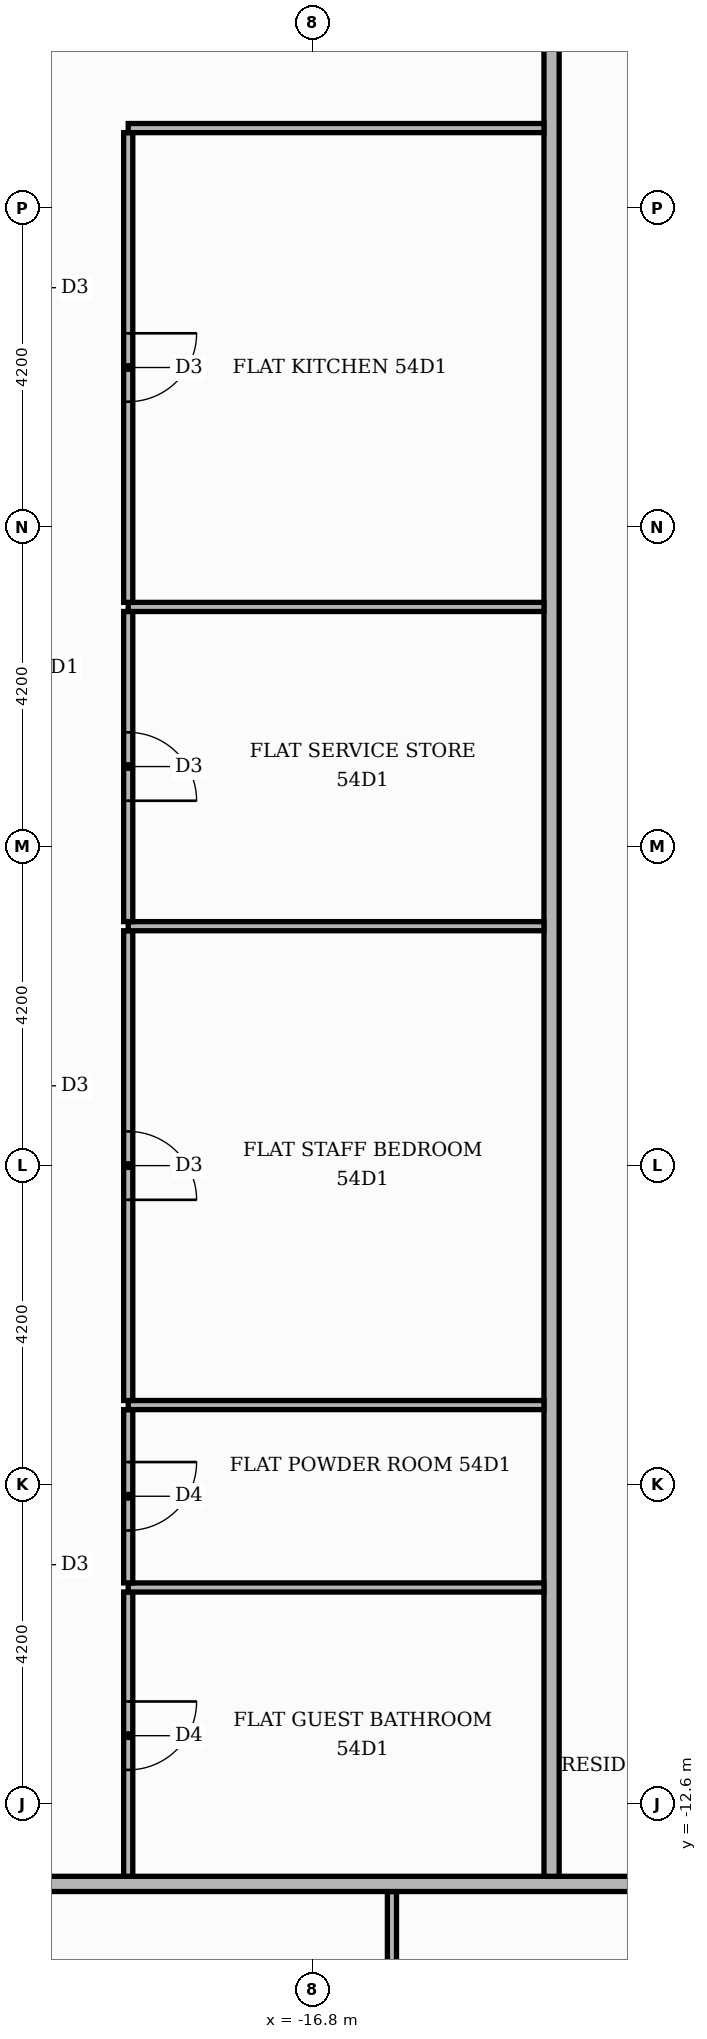
"""IFC4 building model, lengths in metres.
Left out: names, types, materials, properties, quantities, classifications, styles, units other than length and angle.
Written with IfcOpenShell. Run it as: python <this file> out.ifc"""

import sys

from ifc_helpers import new_model, si_unit, direction, frame, frame_2d, origin, place, context, subcontext, project, spatial, rectangle, extrude, element, fill, save


model = new_model("IFC4")
c1 = context("Model", 3, precision=1e-05, world=origin(), true_north=direction((0.0, 1.0)))
c2 = subcontext(c1, "Body", "Model", "MODEL_VIEW")
j1 = project(units=[si_unit("LENGTHUNIT", "METRE"), si_unit("PLANEANGLEUNIT", "RADIAN")], contexts=[c1])
p1 = place(None, origin())
s1 = spatial("IfcSite", under=j1, at=p1, CompositionType="ELEMENT")
p2 = place(p1, origin())
s2 = spatial("IfcBuilding", under=s1, at=p2, CompositionType="ELEMENT")
p3 = place(p2, frame((0.0, 0.0, 227.4)))
s3 = spatial("IfcBuildingStorey", under=s2, at=p3, CompositionType="ELEMENT", Elevation=227.4)
p4 = place(p3, frame((-15.75, -20.36, 0.0), z_axis=(0.0, 0.0, 1.0), x_axis=(0.0, 1.0, 0.0)))
e1 = element("IfcWall", 1, at=p4, inside=s3, PredefinedType="PARTITIONING", context=c2, shape_type="SweptSolid", body=[
    extrude(rectangle(XDim=6.61, YDim=0.12, at=frame_2d((3.305, 0.0))), origin(), (0.0, 0.0, 1.0), 3.48),
])
p5 = place(p4, frame((2.825, 0.0, 0.0)))
e2 = element("IfcOpeningElement", 2, at=p5, cuts=e1, PredefinedType="OPENING", context=c2, shape_type="SweptSolid", body=[
    extrude(rectangle(XDim=1.0, YDim=2.1, at=frame_2d((0.5, 1.05))), frame((0.0, 0.07, 0.0), z_axis=(0.0, -1.0, 0.0), x_axis=(1.0, 0.0, 0.0)), (0.0, 0.0, 1.0), 0.14),
])
p6 = place(p3, frame((-25.42, -13.65, 0.0), z_axis=(0.0, 0.0, 1.0), x_axis=(1.0, 0.0, 0.0)))
e3 = element("IfcWall", 3, at=p6, inside=s3, PredefinedType="PARTITIONING", context=c2, shape_type="SweptSolid", body=[
    extrude(rectangle(XDim=39.07, YDim=0.2, at=frame_2d((19.535, 0.0))), origin(), (0.0, 0.0, 1.0), 3.48),
])
p7 = place(p6, frame((13.32, 0.0, 0.0)))
e4 = element("IfcOpeningElement", 4, at=p7, cuts=e3, PredefinedType="OPENING", context=c2, shape_type="SweptSolid", body=[
    extrude(rectangle(XDim=1.1, YDim=2.4, at=frame_2d((0.55, 1.2))), frame((0.0, 0.11, 0.0), z_axis=(0.0, -1.0, 0.0), x_axis=(1.0, 0.0, 0.0)), (0.0, 0.0, 1.0), 0.22),
])
p8 = place(p6, frame((23.82, 0.0, 0.0)))
e5 = element("IfcOpeningElement", 5, at=p8, cuts=e3, PredefinedType="OPENING", context=c2, shape_type="SweptSolid", body=[
    extrude(rectangle(XDim=1.1, YDim=2.4, at=frame_2d((0.55, 1.2))), frame((0.0, 0.11, 0.0), z_axis=(0.0, -1.0, 0.0), x_axis=(1.0, 0.0, 0.0)), (0.0, 0.0, 1.0), 0.22),
])
p9 = place(p3, frame((-19.22, -13.55, 0.0), z_axis=(0.0, 0.0, 1.0), x_axis=(0.0, 1.0, 0.0)))
e6 = element("IfcWall", 6, at=p9, inside=s3, PredefinedType="PARTITIONING", context=c2, shape_type="SweptSolid", body=[
    extrude(rectangle(XDim=3.74, YDim=0.12, at=frame_2d((1.87, 0.0))), origin(), (0.0, 0.0, 1.0), 3.48),
])
p10 = place(p9, frame((1.4, 0.0, 0.0)))
e7 = element("IfcOpeningElement", 7, at=p10, cuts=e6, PredefinedType="OPENING", context=c2, shape_type="SweptSolid", body=[
    extrude(rectangle(XDim=0.9, YDim=2.1, at=frame_2d((0.45, 1.05))), frame((0.0, 0.07, 0.0), z_axis=(0.0, -1.0, 0.0), x_axis=(1.0, 0.0, 0.0)), (0.0, 0.0, 1.0), 0.14),
])
p11 = place(p3, frame((-13.65, -13.55, 0.0), z_axis=(0.0, 0.0, 1.0), x_axis=(0.0, 1.0, 0.0)))
e8 = element("IfcWall", 8, at=p11, inside=s3, PredefinedType="PARTITIONING", context=c2, shape_type="SweptSolid", body=[
    extrude(rectangle(XDim=27.1, YDim=0.2, at=frame_2d((13.55, 0.0))), origin(), (0.0, 0.0, 1.0), 3.48),
])
p12 = place(p11, frame((24.55, 0.0, 0.0)))
e9 = element("IfcOpeningElement", 9, at=p12, cuts=e8, PredefinedType="OPENING", context=c2, shape_type="SweptSolid", body=[
    extrude(rectangle(XDim=1.1, YDim=2.4, at=frame_2d((0.55, 1.2))), frame((0.0, 0.11, 0.0), z_axis=(0.0, -1.0, 0.0), x_axis=(1.0, 0.0, 0.0)), (0.0, 0.0, 1.0), 0.22),
])
p13 = place(p3, frame((-19.22, -9.75, 0.0), z_axis=(0.0, 0.0, 1.0), x_axis=(1.0, 0.0, 0.0)))
e10 = element("IfcWall", 10, at=p13, inside=s3, PredefinedType="PARTITIONING", context=c2, shape_type="SweptSolid", body=[
    extrude(rectangle(XDim=5.47, YDim=0.12, at=frame_2d((2.735, 0.0))), origin(), (0.0, 0.0, 1.0), 3.48),
])
p14 = place(p3, frame((-19.22, -9.69, 0.0), z_axis=(0.0, 0.0, 1.0), x_axis=(0.0, 1.0, 0.0)))
e11 = element("IfcWall", 11, at=p14, inside=s3, PredefinedType="PARTITIONING", context=c2, shape_type="SweptSolid", body=[
    extrude(rectangle(XDim=2.28, YDim=0.12, at=frame_2d((1.14, 0.0))), origin(), (0.0, 0.0, 1.0), 3.48),
])
p15 = place(p14, frame((0.69, 0.0, 0.0)))
e12 = element("IfcOpeningElement", 12, at=p15, cuts=e11, PredefinedType="OPENING", context=c2, shape_type="SweptSolid", body=[
    extrude(rectangle(XDim=0.9, YDim=2.1, at=frame_2d((0.45, 1.05))), frame((0.0, 0.07, 0.0), z_axis=(0.0, -1.0, 0.0), x_axis=(1.0, 0.0, 0.0)), (0.0, 0.0, 1.0), 0.14),
])
p16 = place(p3, frame((-19.22, -7.35, 0.0), z_axis=(0.0, 0.0, 1.0), x_axis=(1.0, 0.0, 0.0)))
e13 = element("IfcWall", 13, at=p16, inside=s3, PredefinedType="PARTITIONING", context=c2, shape_type="SweptSolid", body=[
    extrude(rectangle(XDim=5.47, YDim=0.12, at=frame_2d((2.735, 0.0))), origin(), (0.0, 0.0, 1.0), 3.48),
])
p17 = place(p3, frame((-19.22, -7.29, 0.0), z_axis=(0.0, 0.0, 1.0), x_axis=(0.0, 1.0, 0.0)))
e14 = element("IfcWall", 14, at=p17, inside=s3, PredefinedType="PARTITIONING", context=c2, shape_type="SweptSolid", body=[
    extrude(rectangle(XDim=6.18, YDim=0.12, at=frame_2d((3.09, 0.0))), origin(), (0.0, 0.0, 1.0), 3.48),
])
p18 = place(p17, frame((2.64, 0.0, 0.0)))
e15 = element("IfcOpeningElement", 15, at=p18, cuts=e14, PredefinedType="OPENING", context=c2, shape_type="SweptSolid", body=[
    extrude(rectangle(XDim=0.9, YDim=2.1, at=frame_2d((0.45, 1.05))), frame((0.0, 0.07, 0.0), z_axis=(0.0, -1.0, 0.0), x_axis=(1.0, 0.0, 0.0)), (0.0, 0.0, 1.0), 0.14),
])
p19 = place(p3, frame((-19.22, -1.05, 0.0), z_axis=(0.0, 0.0, 1.0), x_axis=(1.0, 0.0, 0.0)))
e16 = element("IfcWall", 16, at=p19, inside=s3, PredefinedType="PARTITIONING", context=c2, shape_type="SweptSolid", body=[
    extrude(rectangle(XDim=5.47, YDim=0.12, at=frame_2d((2.735, 0.0))), origin(), (0.0, 0.0, 1.0), 3.48),
])
p20 = place(p3, frame((-19.22, -0.99, 0.0), z_axis=(0.0, 0.0, 1.0), x_axis=(0.0, 1.0, 0.0)))
e17 = element("IfcWall", 17, at=p20, inside=s3, PredefinedType="PARTITIONING", context=c2, shape_type="SweptSolid", body=[
    extrude(rectangle(XDim=4.08, YDim=0.12, at=frame_2d((2.04, 0.0))), origin(), (0.0, 0.0, 1.0), 3.48),
])
p21 = place(p20, frame((1.59, 0.0, 0.0)))
e18 = element("IfcOpeningElement", 18, at=p21, cuts=e17, PredefinedType="OPENING", context=c2, shape_type="SweptSolid", body=[
    extrude(rectangle(XDim=0.9, YDim=2.1, at=frame_2d((0.45, 1.05))), frame((0.0, 0.07, 0.0), z_axis=(0.0, -1.0, 0.0), x_axis=(1.0, 0.0, 0.0)), (0.0, 0.0, 1.0), 0.14),
])
p22 = place(p3, frame((-19.22, 3.15, 0.0), z_axis=(0.0, 0.0, 1.0), x_axis=(1.0, 0.0, 0.0)))
e19 = element("IfcWall", 19, at=p22, inside=s3, PredefinedType="PARTITIONING", context=c2, shape_type="SweptSolid", body=[
    extrude(rectangle(XDim=5.47, YDim=0.12, at=frame_2d((2.735, 0.0))), origin(), (0.0, 0.0, 1.0), 3.48),
])
p23 = place(p3, frame((-19.22, 3.21, 0.0), z_axis=(0.0, 0.0, 1.0), x_axis=(0.0, 1.0, 0.0)))
e20 = element("IfcWall", 20, at=p23, inside=s3, PredefinedType="PARTITIONING", context=c2, shape_type="SweptSolid", body=[
    extrude(rectangle(XDim=6.18, YDim=0.12, at=frame_2d((3.09, 0.0))), origin(), (0.0, 0.0, 1.0), 3.48),
])
p24 = place(p23, frame((2.64, 0.0, 0.0)))
e21 = element("IfcOpeningElement", 21, at=p24, cuts=e20, PredefinedType="OPENING", context=c2, shape_type="SweptSolid", body=[
    extrude(rectangle(XDim=0.9, YDim=2.1, at=frame_2d((0.45, 1.05))), frame((0.0, 0.07, 0.0), z_axis=(0.0, -1.0, 0.0), x_axis=(1.0, 0.0, 0.0)), (0.0, 0.0, 1.0), 0.14),
])
p25 = place(p3, frame((-19.22, 9.45, 0.0), z_axis=(0.0, 0.0, 1.0), x_axis=(1.0, 0.0, 0.0)))
e22 = element("IfcWall", 22, at=p25, inside=s3, PredefinedType="PARTITIONING", context=c2, shape_type="SweptSolid", body=[
    extrude(rectangle(XDim=5.47, YDim=0.12, at=frame_2d((2.735, 0.0))), origin(), (0.0, 0.0, 1.0), 3.48),
])
p26 = place(p24, frame((0.9, 0.0, 0.0), z_axis=(0.0, 0.0, 1.0), x_axis=(-1.0, 0.0, 0.0)))
e23 = element("IfcDoor", 23, at=p26, inside=s3, OperationType="SINGLE_SWING_RIGHT", PredefinedType="DOOR", context=c2, shape_type="SweptSolid", body=[
    extrude(rectangle(XDim=0.9, YDim=2.1, at=frame_2d((0.45, 1.05))), frame((0.0, 0.025, 0.0), z_axis=(0.0, -1.0, 0.0), x_axis=(1.0, 0.0, 0.0)), (0.0, 0.0, 1.0), 0.05),
])
fill(e21, e23)
p27 = place(p21, frame((0.9, 0.0, 0.0), z_axis=(0.0, 0.0, 1.0), x_axis=(-1.0, 0.0, 0.0)))
e24 = element("IfcDoor", 24, at=p27, inside=s3, OperationType="SINGLE_SWING_LEFT", PredefinedType="DOOR", context=c2, shape_type="SweptSolid", body=[
    extrude(rectangle(XDim=0.9, YDim=2.1, at=frame_2d((0.45, 1.05))), frame((0.0, 0.025, 0.0), z_axis=(0.0, -1.0, 0.0), x_axis=(1.0, 0.0, 0.0)), (0.0, 0.0, 1.0), 0.05),
])
fill(e18, e24)
p28 = place(p18, frame((0.9, 0.0, 0.0), z_axis=(0.0, 0.0, 1.0), x_axis=(-1.0, 0.0, 0.0)))
e25 = element("IfcDoor", 25, at=p28, inside=s3, OperationType="SINGLE_SWING_LEFT", PredefinedType="DOOR", context=c2, shape_type="SweptSolid", body=[
    extrude(rectangle(XDim=0.9, YDim=2.1, at=frame_2d((0.45, 1.05))), frame((0.0, 0.025, 0.0), z_axis=(0.0, -1.0, 0.0), x_axis=(1.0, 0.0, 0.0)), (0.0, 0.0, 1.0), 0.05),
])
fill(e15, e25)
p29 = place(p15, frame((0.9, 0.0, 0.0), z_axis=(0.0, 0.0, 1.0), x_axis=(-1.0, 0.0, 0.0)))
e26 = element("IfcDoor", 26, at=p29, inside=s3, OperationType="SINGLE_SWING_RIGHT", PredefinedType="DOOR", context=c2, shape_type="SweptSolid", body=[
    extrude(rectangle(XDim=0.9, YDim=2.1, at=frame_2d((0.45, 1.05))), frame((0.0, 0.025, 0.0), z_axis=(0.0, -1.0, 0.0), x_axis=(1.0, 0.0, 0.0)), (0.0, 0.0, 1.0), 0.05),
])
fill(e12, e26)
p30 = place(p10, frame((0.9, 0.0, 0.0), z_axis=(0.0, 0.0, 1.0), x_axis=(-1.0, 0.0, 0.0)))
e27 = element("IfcDoor", 27, at=p30, inside=s3, OperationType="SINGLE_SWING_RIGHT", PredefinedType="DOOR", context=c2, shape_type="SweptSolid", body=[
    extrude(rectangle(XDim=0.9, YDim=2.1, at=frame_2d((0.45, 1.05))), frame((0.0, 0.025, 0.0), z_axis=(0.0, -1.0, 0.0), x_axis=(1.0, 0.0, 0.0)), (0.0, 0.0, 1.0), 0.05),
])
fill(e7, e27)
save(model, sys.argv[1])
